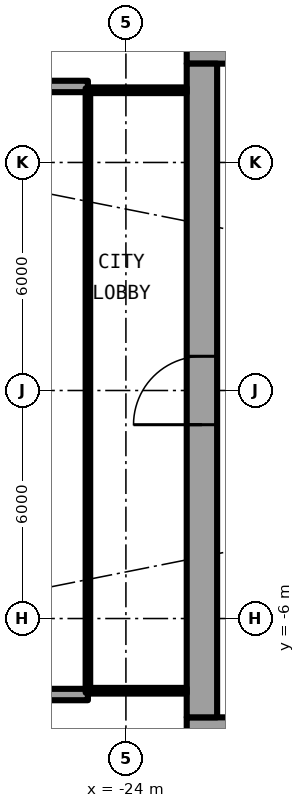
"""IFC4 building model, lengths in metres.
Left out: names, types, materials, properties, quantities, classifications, styles, units other than length and angle.
Written with IfcOpenShell. Run it as: python <this file> out.ifc"""

import sys

from ifc_helpers import new_model, si_unit, direction, frame, frame_2d, origin, place, context, subcontext, project, spatial, rectangle, extrude, element, fill, save


model = new_model("IFC4")
c1 = context("Model", 3, precision=1e-05, world=origin(), true_north=direction((0.0, 1.0)))
c2 = subcontext(c1, "Body", "Model", "MODEL_VIEW")
j1 = project(units=[si_unit("LENGTHUNIT", "METRE"), si_unit("PLANEANGLEUNIT", "RADIAN")], contexts=[c1])
p1 = place(None, origin())
s1 = spatial("IfcSite", under=j1, at=p1, CompositionType="ELEMENT")
p2 = place(p1, origin())
s2 = spatial("IfcBuilding", under=s1, at=p2, CompositionType="ELEMENT")
p3 = place(p2, frame((0.0, 0.0, 47.2)))
s3 = spatial("IfcBuildingStorey", under=s2, at=p3, CompositionType="ELEMENT", Elevation=47.2)
for number, where, z_axis, x_axis in (
    (1, (-25.0, 8.0, 0.0), (0.0, 0.0, 1.0), (-1.0, 0.0, 0.0)),
    (2, (-25.0, -8.0, 0.0), (0.0, 0.0, 1.0), (-1.0, 0.0, 0.0)),
):
    element("IfcWall", number, at=place(p3, frame(where, z_axis=z_axis, x_axis=x_axis)), inside=s3, PredefinedType="SOLIDWALL", context=c2, shape_type="SweptSolid", body=[
        extrude(rectangle(XDim=2.667, YDim=0.3, at=frame_2d((1.333, 0.0))), origin(), (0.0, 0.0, 1.0), 2.7),
    ])
p4 = place(p3, frame((-22.4, -9.0, 0.0), z_axis=(0.0, 0.0, 1.0), x_axis=(1.0, 0.0, 0.0)))
e3 = element("IfcWall", 3, at=p4, inside=s3, PredefinedType="SHEAR", context=c2, shape_type="SweptSolid", body=[
    extrude(rectangle(XDim=14.2, YDim=0.8, at=frame_2d((7.1, 0.0))), origin(), (0.0, 0.0, 1.0), 3.05),
])
p5 = place(p4, frame((1.325, 0.0, 0.0)))
e4 = element("IfcOpeningElement", 4, at=p5, cuts=e3, PredefinedType="OPENING", context=c2, shape_type="SweptSolid", body=[
    extrude(rectangle(XDim=1.2, YDim=2.3, at=frame_2d((0.6, 1.15))), frame((0.0, 0.41, 0.0), z_axis=(0.0, -1.0, 0.0), x_axis=(1.0, 0.0, 0.0)), (0.0, 0.0, 1.0), 0.82),
])
p6 = place(p3, frame((-8.2, 9.0, 0.0), z_axis=(0.0, 0.0, 1.0), x_axis=(-1.0, 0.0, 0.0)))
e5 = element("IfcWall", 5, at=p6, inside=s3, PredefinedType="SHEAR", context=c2, shape_type="SweptSolid", body=[
    extrude(rectangle(XDim=14.2, YDim=0.8, at=frame_2d((7.1, 0.0))), origin(), (0.0, 0.0, 1.0), 3.05),
])
p7 = place(p6, frame((11.675, 0.0, 0.0)))
e6 = element("IfcOpeningElement", 6, at=p7, cuts=e5, PredefinedType="OPENING", context=c2, shape_type="SweptSolid", body=[
    extrude(rectangle(XDim=1.2, YDim=2.3, at=frame_2d((0.6, 1.15))), frame((0.0, 0.41, 0.0), z_axis=(0.0, -1.0, 0.0), x_axis=(1.0, 0.0, 0.0)), (0.0, 0.0, 1.0), 0.82),
])
p8 = place(p3, frame((-22.0, -8.6, 0.0), z_axis=(0.0, 0.0, 1.0), x_axis=(0.0, 1.0, 0.0)))
e7 = element("IfcWall", 7, at=p8, inside=s3, PredefinedType="SHEAR", context=c2, shape_type="SweptSolid", body=[
    extrude(rectangle(XDim=17.2, YDim=0.8, at=frame_2d((8.6, 0.0))), origin(), (0.0, 0.0, 1.0), 3.05),
])
p9 = place(p8, frame((7.7, 0.0, 0.0)))
e8 = element("IfcOpeningElement", 8, at=p9, cuts=e7, PredefinedType="OPENING", context=c2, shape_type="SweptSolid", body=[
    extrude(rectangle(XDim=1.8, YDim=2.3, at=frame_2d((0.9, 1.15))), frame((0.0, 0.41, 0.0), z_axis=(0.0, -1.0, 0.0), x_axis=(1.0, 0.0, 0.0)), (0.0, 0.0, 1.0), 0.82),
])
for number, where, z_axis, x_axis in (
    (9, (-22.4, 7.9, 0.0), (0.0, 0.0, 1.0), (-1.0, 0.0, 0.0)),
    (10, (-22.4, -7.9, 0.0), (0.0, 0.0, 1.0), (-1.0, 0.0, 0.0)),
):
    element("IfcWall", number, at=place(p3, frame(where, z_axis=z_axis, x_axis=x_axis)), inside=s3, PredefinedType="PARTITIONING", context=c2, shape_type="SweptSolid", body=[
        extrude(rectangle(XDim=2.54, YDim=0.15, at=frame_2d((1.27, 0.0))), origin(), (0.0, 0.0, 1.0), 2.7),
    ])
p10 = place(p3, frame((-25.0, 7.95, 0.0), z_axis=(0.0, 0.0, 1.0), x_axis=(0.0, -1.0, 0.0)))
e11 = element("IfcWall", 11, at=p10, inside=s3, PredefinedType="PARTITIONING", context=c2, shape_type="SweptSolid", body=[
    extrude(rectangle(XDim=15.9, YDim=0.12, at=frame_2d((7.95, 0.0))), origin(), (0.0, 0.0, 1.0), 2.7),
])
p11 = place(p10, frame((0.95, 0.0, 0.1)))
e12 = element("IfcOpeningElement", 12, at=p11, cuts=e11, PredefinedType="OPENING", context=c2, shape_type="SweptSolid", body=[
    extrude(rectangle(XDim=14.0, YDim=2.35, at=frame_2d((7.0, 1.175))), frame((0.0, 0.07, 0.0), z_axis=(0.0, -1.0, 0.0), x_axis=(1.0, 0.0, 0.0)), (0.0, 0.0, 1.0), 0.14),
])
p12 = place(p9, origin())
e13 = element("IfcDoor", 13, at=p12, inside=s3, OperationType="SINGLE_SWING_LEFT", PredefinedType="DOOR", context=c2, shape_type="SweptSolid", body=[
    extrude(rectangle(XDim=1.8, YDim=2.3, at=frame_2d((0.9, 1.15))), frame((0.0, 0.025, 0.0), z_axis=(0.0, -1.0, 0.0), x_axis=(1.0, 0.0, 0.0)), (0.0, 0.0, 1.0), 0.05),
])
fill(e8, e13)
p13 = place(p11, origin())
e14 = element("IfcWindow", 14, at=p13, inside=s3, PartitioningType="SINGLE_PANEL", PredefinedType="WINDOW", context=c2, shape_type="SweptSolid", body=[
    extrude(rectangle(XDim=14.0, YDim=2.35, at=frame_2d((7.0, 1.175))), frame((0.0, 0.03, 0.0), z_axis=(0.0, -1.0, 0.0), x_axis=(1.0, 0.0, 0.0)), (0.0, 0.0, 1.0), 0.06),
])
fill(e12, e14)
save(model, sys.argv[1])
